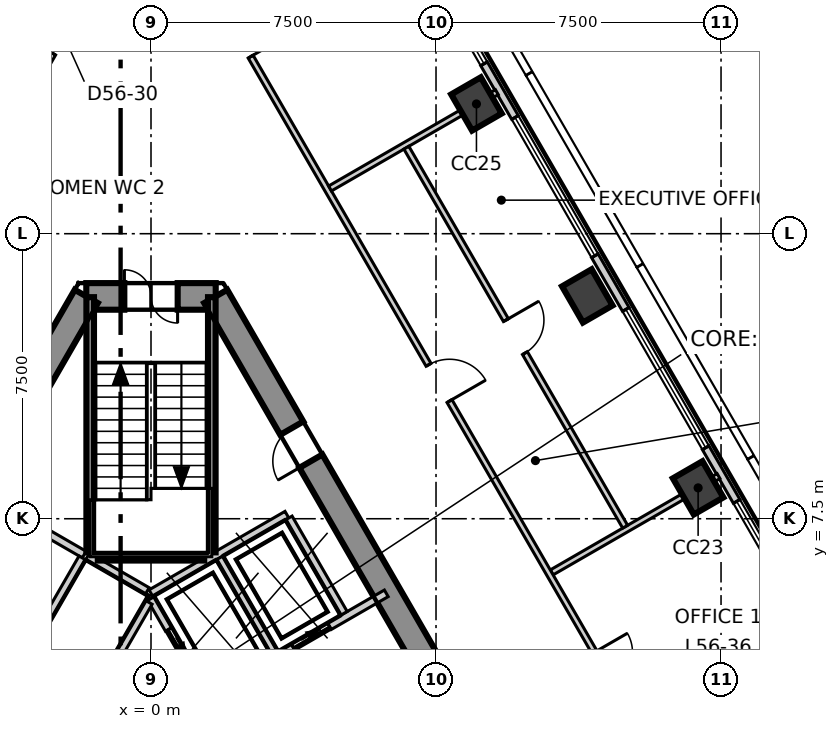
"""IFC4 building model, lengths in metres.
Left out: names, types, materials, properties, quantities, classifications, styles, units other than length and angle.
Written with IfcOpenShell. Run it as: python <this file> out.ifc"""

import sys

from ifc_helpers import new_model, si_unit, direction, frame, frame_2d, origin, origin_2d, place, context, subcontext, project, spatial, polyline, rectangle, outline, extrude, element, fill, save


model = new_model("IFC4")
c1 = context("Model", 3, precision=1e-05, world=origin(), true_north=direction((0.0, 1.0)))
c2 = subcontext(c1, "Body", "Model", "MODEL_VIEW")
j1 = project(units=[si_unit("LENGTHUNIT", "METRE"), si_unit("PLANEANGLEUNIT", "RADIAN")], contexts=[c1])
p1 = place(None, origin())
s1 = spatial("IfcSite", under=j1, at=p1, CompositionType="ELEMENT")
p2 = place(p1, origin())
s2 = spatial("IfcBuilding", under=s1, at=p2, CompositionType="ELEMENT")
p3 = place(p2, frame((0.0, 0.0, 239.3)))
s3 = spatial("IfcBuildingStorey", under=s2, at=p3, CompositionType="ELEMENT", Elevation=239.3)
p4 = place(p3, frame((1.703, 13.35, -0.3), z_axis=(0.0, 0.0, 1.0), x_axis=(-1.0, 0.0, 0.0)))
e1 = element("IfcWall", 1, at=p4, inside=s3, PredefinedType="SHEAR", context=c2, shape_type="SweptSolid", body=[
    extrude(outline(polyline([(-0.202, -0.35), (1.703, -0.35), (3.608, -0.35), (3.204, 0.35), (1.703, 0.35), (0.202, 0.35), (-0.202, -0.35)])), origin(), (0.0, 0.0, 1.0), 4.0),
])
p5 = place(p4, frame((1.003, 0.0, 0.3)))
e2 = element("IfcOpeningElement", 2, at=p5, cuts=e1, PredefinedType="OPENING", context=c2, shape_type="SweptSolid", body=[
    extrude(rectangle(XDim=1.4, YDim=2.1, at=frame_2d((0.7, 1.05))), frame((0.0, 0.36, 0.0), z_axis=(0.0, -1.0, 0.0), x_axis=(1.0, 0.0, 0.0)), (0.0, 0.0, 1.0), 0.72),
])
p6 = place(p3, frame((-1.703, 13.35, -0.3), z_axis=(0.0, 0.0, 1.0), x_axis=(-0.500011533395, -0.866018744874, 0.0)))
e3 = element("IfcWall", 3, at=p6, inside=s3, PredefinedType="SHEAR", context=c2, shape_type="SweptSolid", body=[
    extrude(outline(polyline([(-0.202, -0.35), (1.782, -0.35), (3.766, -0.35), (5.75, -0.35), (7.734, -0.35), (9.718, -0.35), (11.702, -0.35), (13.686, -0.35), (15.67, -0.35), (17.654, -0.35), (19.638, -0.35), (21.622, -0.35), (21.218, 0.35), (19.307, 0.35), (17.397, 0.35), (15.486, 0.35), (13.576, 0.35), (11.665, 0.35), (9.755, 0.35), (7.844, 0.35), (5.934, 0.35), (4.023, 0.35), (2.113, 0.35), (0.202, 0.35), (-0.202, -0.35)])), origin(), (0.0, 0.0, 1.0), 4.0),
])
p7 = place(p6, frame((10.16, 0.0, 0.3)))
e4 = element("IfcOpeningElement", 4, at=p7, cuts=e3, PredefinedType="OPENING", context=c2, shape_type="SweptSolid", body=[
    extrude(rectangle(XDim=1.1, YDim=2.1, at=frame_2d((0.55, 1.05))), frame((0.0, 0.36, 0.0), z_axis=(0.0, -1.0, 0.0), x_axis=(1.0, 0.0, 0.0)), (0.0, 0.0, 1.0), 0.72),
])
p8 = place(p3, frame((12.413, -5.2, -0.3), z_axis=(0.0, 0.0, 1.0), x_axis=(-0.500011533395, 0.866018744874, 0.0)))
e5 = element("IfcWall", 5, at=p8, inside=s3, PredefinedType="SHEAR", context=c2, shape_type="SweptSolid", body=[
    extrude(outline(polyline([(-0.202, -0.35), (1.782, -0.35), (3.766, -0.35), (5.75, -0.35), (7.734, -0.35), (9.718, -0.35), (11.702, -0.35), (13.686, -0.35), (15.67, -0.35), (17.654, -0.35), (19.638, -0.35), (21.622, -0.35), (21.218, 0.35), (19.307, 0.35), (17.397, 0.35), (15.486, 0.35), (13.576, 0.35), (11.665, 0.35), (9.755, 0.35), (7.844, 0.35), (5.934, 0.35), (4.023, 0.35), (2.113, 0.35), (0.202, 0.35), (-0.202, -0.35)])), origin(), (0.0, 0.0, 1.0), 4.0),
])
p9 = place(p8, frame((4.055, 0.0, 0.3)))
e6 = element("IfcOpeningElement", 6, at=p9, cuts=e5, PredefinedType="OPENING", context=c2, shape_type="SweptSolid", body=[
    extrude(rectangle(XDim=0.9, YDim=2.1, at=frame_2d((0.45, 1.05))), frame((0.0, 0.36, 0.0), z_axis=(0.0, -1.0, 0.0), x_axis=(1.0, 0.0, 0.0)), (0.0, 0.0, 1.0), 0.72),
])
p10 = place(p8, frame((16.415, 0.0, 0.3)))
e7 = element("IfcOpeningElement", 7, at=p10, cuts=e5, PredefinedType="OPENING", context=c2, shape_type="SweptSolid", body=[
    extrude(rectangle(XDim=1.0, YDim=2.1, at=frame_2d((0.5, 1.05))), frame((0.0, 0.36, 0.0), z_axis=(0.0, -1.0, 0.0), x_axis=(1.0, 0.0, 0.0)), (0.0, 0.0, 1.0), 0.72),
])
for number, where, z_axis, x_axis in (
    (8, (14.397, 8.312, -0.3), (0.0, 0.0, 1.0), (-0.5, 0.866, 0.0)),
    (9, (11.481, 13.363, -0.3), (0.0, 0.0, 1.0), (-0.5, 0.866, 0.0)),
    (10, (8.564, 18.414, -0.3), (0.0, 0.0, 1.0), (-0.5, 0.866, 0.0)),
):
    element("IfcColumn", number, at=place(p3, frame(where, z_axis=z_axis, x_axis=x_axis)), inside=s3, PredefinedType="COLUMN", context=c2, shape_type="SweptSolid", body=[
        extrude(rectangle(XDim=1.1, YDim=0.9, at=origin_2d()), origin(), (0.0, 0.0, 1.0), 4.0),
    ])
p11 = place(p3, frame((27.32, -12.671, 0.0), z_axis=(0.0, 0.0, 1.0), x_axis=(-0.499995097538, 0.866028234204, 0.0)))
e11 = element("IfcWall", 11, at=p11, inside=s3, PredefinedType="ELEMENTEDWALL", context=c2, shape_type="SweptSolid", body=[
    extrude(rectangle(XDim=49.247, YDim=0.2, at=frame_2d((24.623, 0.0))), origin(), (0.0, 0.0, 1.0), 3.7),
])
p12 = place(p11, frame((2.119, 0.0, 0.9)))
e12 = element("IfcOpeningElement", 12, at=p12, cuts=e11, PredefinedType="OPENING", context=c2, shape_type="SweptSolid", body=[
    extrude(rectangle(XDim=4.2, YDim=2.5, at=frame_2d((2.1, 1.25))), frame((0.0, 0.11, 0.0), z_axis=(0.0, -1.0, 0.0), x_axis=(1.0, 0.0, 0.0)), (0.0, 0.0, 1.0), 0.22),
])
p13 = place(p11, frame((7.952, 0.0, 0.9)))
e13 = element("IfcOpeningElement", 13, at=p13, cuts=e11, PredefinedType="OPENING", context=c2, shape_type="SweptSolid", body=[
    extrude(rectangle(XDim=4.2, YDim=2.5, at=frame_2d((2.1, 1.25))), frame((0.0, 0.11, 0.0), z_axis=(0.0, -1.0, 0.0), x_axis=(1.0, 0.0, 0.0)), (0.0, 0.0, 1.0), 0.22),
])
p14 = place(p11, frame((13.784, 0.0, 0.9)))
e14 = element("IfcOpeningElement", 14, at=p14, cuts=e11, PredefinedType="OPENING", context=c2, shape_type="SweptSolid", body=[
    extrude(rectangle(XDim=4.2, YDim=2.5, at=frame_2d((2.1, 1.25))), frame((0.0, 0.11, 0.0), z_axis=(0.0, -1.0, 0.0), x_axis=(1.0, 0.0, 0.0)), (0.0, 0.0, 1.0), 0.22),
])
p15 = place(p11, frame((19.617, 0.0, 0.9)))
e15 = element("IfcOpeningElement", 15, at=p15, cuts=e11, PredefinedType="OPENING", context=c2, shape_type="SweptSolid", body=[
    extrude(rectangle(XDim=4.2, YDim=2.5, at=frame_2d((2.1, 1.25))), frame((0.0, 0.11, 0.0), z_axis=(0.0, -1.0, 0.0), x_axis=(1.0, 0.0, 0.0)), (0.0, 0.0, 1.0), 0.22),
])
p16 = place(p11, frame((25.45, 0.0, 0.9)))
e16 = element("IfcOpeningElement", 16, at=p16, cuts=e11, PredefinedType="OPENING", context=c2, shape_type="SweptSolid", body=[
    extrude(rectangle(XDim=4.2, YDim=2.5, at=frame_2d((2.1, 1.25))), frame((0.0, 0.11, 0.0), z_axis=(0.0, -1.0, 0.0), x_axis=(1.0, 0.0, 0.0)), (0.0, 0.0, 1.0), 0.22),
])
p17 = place(p11, frame((31.282, 0.0, 0.9)))
e17 = element("IfcOpeningElement", 17, at=p17, cuts=e11, PredefinedType="OPENING", context=c2, shape_type="SweptSolid", body=[
    extrude(rectangle(XDim=4.2, YDim=2.5, at=frame_2d((2.1, 1.25))), frame((0.0, 0.11, 0.0), z_axis=(0.0, -1.0, 0.0), x_axis=(1.0, 0.0, 0.0)), (0.0, 0.0, 1.0), 0.22),
])
p18 = place(p11, frame((37.115, 0.0, 0.9)))
e18 = element("IfcOpeningElement", 18, at=p18, cuts=e11, PredefinedType="OPENING", context=c2, shape_type="SweptSolid", body=[
    extrude(rectangle(XDim=4.2, YDim=2.5, at=frame_2d((2.1, 1.25))), frame((0.0, 0.11, 0.0), z_axis=(0.0, -1.0, 0.0), x_axis=(1.0, 0.0, 0.0)), (0.0, 0.0, 1.0), 0.22),
])
p19 = place(p11, frame((42.947, 0.0, 0.9)))
e19 = element("IfcOpeningElement", 19, at=p19, cuts=e11, PredefinedType="OPENING", context=c2, shape_type="SweptSolid", body=[
    extrude(rectangle(XDim=4.2, YDim=2.5, at=frame_2d((2.1, 1.25))), frame((0.0, 0.11, 0.0), z_axis=(0.0, -1.0, 0.0), x_axis=(1.0, 0.0, 0.0)), (0.0, 0.0, 1.0), 0.22),
])
p20 = place(p3, frame((10.544, 6.088, 0.0), z_axis=(0.0, 0.0, 1.0), x_axis=(0.866065287345, 0.499930913282, 0.0)))
e20 = element("IfcWall", 20, at=p20, inside=s3, PredefinedType="PARTITIONING", context=c2, shape_type="SweptSolid", body=[
    extrude(rectangle(XDim=5.069, YDim=0.15, at=frame_2d((2.535, 0.0))), origin(), (0.0, 0.0, 1.0), 3.2),
])
p21 = place(p3, frame((-20.883, -11.97, 0.0), z_axis=(0.0, 0.0, 1.0), x_axis=(0.500006150555, 0.866021852731, 0.0)))
e21 = element("IfcWall", 21, at=p21, inside=s3, PredefinedType="PARTITIONING", context=c2, shape_type="SweptSolid", body=[
    extrude(rectangle(XDim=41.766, YDim=0.15, at=frame_2d((20.883, 0.0))), origin(), (0.0, 0.0, 1.0), 3.7),
])
p22 = place(p21, frame((36.616, 0.0, 0.0)))
e22 = element("IfcOpeningElement", 22, at=p22, cuts=e21, PredefinedType="OPENING", context=c2, shape_type="SweptSolid", body=[
    extrude(rectangle(XDim=1.1, YDim=2.1, at=frame_2d((0.55, 1.05))), frame((0.0, 0.085, 0.0), z_axis=(0.0, -1.0, 0.0), x_axis=(1.0, 0.0, 0.0)), (0.0, 0.0, 1.0), 0.17),
])
p23 = place(p21, frame((21.723, 0.0, 0.0)))
e23 = element("IfcOpeningElement", 23, at=p23, cuts=e21, PredefinedType="OPENING", context=c2, shape_type="SweptSolid", body=[
    extrude(rectangle(XDim=1.1, YDim=2.1, at=frame_2d((0.55, 1.05))), frame((0.0, 0.085, 0.0), z_axis=(0.0, -1.0, 0.0), x_axis=(1.0, 0.0, 0.0)), (0.0, 0.0, 1.0), 0.17),
])
p24 = place(p21, frame((30.423, 0.0, 0.0)))
e24 = element("IfcOpeningElement", 24, at=p24, cuts=e21, PredefinedType="OPENING", context=c2, shape_type="SweptSolid", body=[
    extrude(rectangle(XDim=0.9, YDim=2.1, at=frame_2d((0.45, 1.05))), frame((0.0, 0.085, 0.0), z_axis=(0.0, -1.0, 0.0), x_axis=(1.0, 0.0, 0.0)), (0.0, 0.0, 1.0), 0.17),
])
p25 = place(p21, frame((27.223, 0.0, 0.0)))
e25 = element("IfcOpeningElement", 25, at=p25, cuts=e21, PredefinedType="OPENING", context=c2, shape_type="SweptSolid", body=[
    extrude(rectangle(XDim=0.9, YDim=2.1, at=frame_2d((0.45, 1.05))), frame((0.0, 0.085, 0.0), z_axis=(0.0, -1.0, 0.0), x_axis=(1.0, 0.0, 0.0)), (0.0, 0.0, 1.0), 0.17),
])
p26 = place(p21, frame((24.323, 0.0, 0.0)))
e26 = element("IfcOpeningElement", 26, at=p26, cuts=e21, PredefinedType="OPENING", context=c2, shape_type="SweptSolid", body=[
    extrude(rectangle(XDim=1.0, YDim=2.1, at=frame_2d((0.5, 1.05))), frame((0.0, 0.085, 0.0), z_axis=(0.0, -1.0, 0.0), x_axis=(1.0, 0.0, 0.0)), (0.0, 0.0, 1.0), 0.17),
])
p27 = place(p21, frame((17.358, 0.0, 0.0)))
e27 = element("IfcOpeningElement", 27, at=p27, cuts=e21, PredefinedType="OPENING", context=c2, shape_type="SweptSolid", body=[
    extrude(rectangle(XDim=1.0, YDim=2.1, at=frame_2d((0.5, 1.05))), frame((0.0, 0.085, 0.0), z_axis=(0.0, -1.0, 0.0), x_axis=(1.0, 0.0, 0.0)), (0.0, 0.0, 1.0), 0.17),
])
p28 = place(p21, frame((6.825, 0.0, 0.0)))
e28 = element("IfcOpeningElement", 28, at=p28, cuts=e21, PredefinedType="OPENING", context=c2, shape_type="SweptSolid", body=[
    extrude(rectangle(XDim=1.1, YDim=2.1, at=frame_2d((0.55, 1.05))), frame((0.0, 0.085, 0.0), z_axis=(0.0, -1.0, 0.0), x_axis=(1.0, 0.0, 0.0)), (0.0, 0.0, 1.0), 0.17),
])
p29 = place(p3, frame((0.075, 24.07, 0.0), z_axis=(0.0, 0.0, 1.0), x_axis=(0.500006834213, -0.866021458014, 0.0)))
e29 = element("IfcWall", 29, at=p29, inside=s3, PredefinedType="PARTITIONING", context=c2, shape_type="SweptSolid", body=[
    extrude(rectangle(XDim=41.616, YDim=0.15, at=frame_2d((20.808, 0.0))), origin(), (0.0, 0.0, 1.0), 3.7),
])
p30 = place(p29, frame((36.616, 0.0, 0.0)))
e30 = element("IfcOpeningElement", 30, at=p30, cuts=e29, PredefinedType="OPENING", context=c2, shape_type="SweptSolid", body=[
    extrude(rectangle(XDim=1.1, YDim=2.1, at=frame_2d((0.55, 1.05))), frame((0.0, 0.085, 0.0), z_axis=(0.0, -1.0, 0.0), x_axis=(1.0, 0.0, 0.0)), (0.0, 0.0, 1.0), 0.17),
])
p31 = place(p29, frame((29.024, 0.0, 0.0)))
e31 = element("IfcOpeningElement", 31, at=p31, cuts=e29, PredefinedType="OPENING", context=c2, shape_type="SweptSolid", body=[
    extrude(rectangle(XDim=1.0, YDim=2.1, at=frame_2d((0.5, 1.05))), frame((0.0, 0.085, 0.0), z_axis=(0.0, -1.0, 0.0), x_axis=(1.0, 0.0, 0.0)), (0.0, 0.0, 1.0), 0.17),
])
p32 = place(p29, frame((23.19, 0.0, 0.0)))
e32 = element("IfcOpeningElement", 32, at=p32, cuts=e29, PredefinedType="OPENING", context=c2, shape_type="SweptSolid", body=[
    extrude(rectangle(XDim=1.0, YDim=2.1, at=frame_2d((0.5, 1.05))), frame((0.0, 0.085, 0.0), z_axis=(0.0, -1.0, 0.0), x_axis=(1.0, 0.0, 0.0)), (0.0, 0.0, 1.0), 0.17),
])
p33 = place(p29, frame((14.458, 0.0, 0.0)))
e33 = element("IfcOpeningElement", 33, at=p33, cuts=e29, PredefinedType="OPENING", context=c2, shape_type="SweptSolid", body=[
    extrude(rectangle(XDim=1.1, YDim=2.1, at=frame_2d((0.55, 1.05))), frame((0.0, 0.085, 0.0), z_axis=(0.0, -1.0, 0.0), x_axis=(1.0, 0.0, 0.0)), (0.0, 0.0, 1.0), 0.17),
])
p34 = place(p29, frame((3.993, 0.0, 0.0)))
e34 = element("IfcOpeningElement", 34, at=p34, cuts=e29, PredefinedType="OPENING", context=c2, shape_type="SweptSolid", body=[
    extrude(rectangle(XDim=1.1, YDim=2.1, at=frame_2d((0.55, 1.05))), frame((0.0, 0.085, 0.0), z_axis=(0.0, -1.0, 0.0), x_axis=(1.0, 0.0, 0.0)), (0.0, 0.0, 1.0), 0.17),
])
p35 = place(p3, frame((4.711, 16.19, 0.0), z_axis=(0.0, 0.0, 1.0), x_axis=(0.866065287345, 0.499930913282, 0.0)))
e35 = element("IfcWall", 35, at=p35, inside=s3, PredefinedType="PARTITIONING", context=c2, shape_type="SweptSolid", body=[
    extrude(rectangle(XDim=5.069, YDim=0.15, at=frame_2d((2.535, 0.0))), origin(), (0.0, 0.0, 1.0), 3.7),
])
p36 = place(p3, frame((6.72, 17.263, 0.0), z_axis=(0.0, 0.0, 1.0), x_axis=(0.499949415664, -0.866054606695, 0.0)))
e36 = element("IfcWall", 36, at=p36, inside=s3, PredefinedType="PARTITIONING", context=c2, shape_type="SweptSolid", body=[
    extrude(rectangle(XDim=11.515, YDim=0.15, at=frame_2d((5.758, 0.0))), origin(), (0.0, 0.0, 1.0), 3.7),
])
p37 = place(p36, frame((5.24, 0.0, 0.0)))
e37 = element("IfcOpeningElement", 37, at=p37, cuts=e36, PredefinedType="OPENING", context=c2, shape_type="SweptSolid", body=[
    extrude(rectangle(XDim=1.0, YDim=2.1, at=frame_2d((0.5, 1.05))), frame((0.0, 0.085, 0.0), z_axis=(0.0, -1.0, 0.0), x_axis=(1.0, 0.0, 0.0)), (0.0, 0.0, 1.0), 0.17),
])
p38 = place(p3, frame((-0.002, 5.541, 0.0), z_axis=(0.0, 0.0, 1.0), x_axis=(0.86600155993, 0.500041296494, 0.0)))
e38 = element("IfcWall", 38, at=p38, inside=s3, PredefinedType="SOLIDWALL", context=c2, shape_type="SweptSolid", body=[
    extrude(rectangle(XDim=4.132, YDim=0.2, at=frame_2d((2.066, 0.0))), origin(), (0.0, 0.0, 1.0), 3.7),
])
p39 = place(p3, frame((0.0, 5.4, 0.0), z_axis=(0.0, 0.0, 1.0), x_axis=(0.500103862429, -0.865965430478, 0.0)))
e39 = element("IfcWall", 39, at=p39, inside=s3, PredefinedType="SOLIDWALL", context=c2, shape_type="SweptSolid", body=[
    extrude(rectangle(XDim=2.973, YDim=0.2, at=frame_2d((1.487, 0.0))), origin(), (0.0, 0.0, 1.0), 3.7),
])
p40 = place(p39, frame((0.937, 0.0, 0.0)))
e40 = element("IfcOpeningElement", 40, at=p40, cuts=e39, PredefinedType="OPENING", context=c2, shape_type="SweptSolid", body=[
    extrude(rectangle(XDim=1.1, YDim=2.1, at=frame_2d((0.55, 1.05))), frame((0.0, 0.11, 0.0), z_axis=(0.0, -1.0, 0.0), x_axis=(1.0, 0.0, 0.0)), (0.0, 0.0, 1.0), 0.22),
])
p41 = place(p3, frame((1.578, 2.874, 0.0), z_axis=(0.0, 0.0, 1.0), x_axis=(0.866045911672, 0.499964477614, 0.0)))
e41 = element("IfcWall", 41, at=p41, inside=s3, PredefinedType="SOLIDWALL", context=c2, shape_type="SweptSolid", body=[
    extrude(rectangle(XDim=5.327, YDim=0.2, at=frame_2d((2.663, 0.0))), origin(), (0.0, 0.0, 1.0), 3.7),
])
p42 = place(p41, frame((2.496, 0.0, 0.0)))
e42 = element("IfcOpeningElement", 42, at=p42, cuts=e41, PredefinedType="OPENING", context=c2, shape_type="SweptSolid", body=[
    extrude(rectangle(XDim=1.1, YDim=2.1, at=frame_2d((0.55, 1.05))), frame((0.0, 0.11, 0.0), z_axis=(0.0, -1.0, 0.0), x_axis=(1.0, 0.0, 0.0)), (0.0, 0.0, 1.0), 0.22),
])
for number, where, z_axis, x_axis in (
    (43, (3.626, 7.52, 0.0), (0.0, 0.0, 1.0), (0.5, -0.866, 0.0)),
    (44, (1.807, 6.47, 0.0), (0.0, 0.0, 1.0), (0.5, -0.866, 0.0)),
):
    element("IfcWall", number, at=place(p3, frame(where, z_axis=z_axis, x_axis=x_axis)), inside=s3, PredefinedType="SOLIDWALL", context=c2, shape_type="SweptSolid", body=[
        extrude(rectangle(XDim=2.9, YDim=0.2, at=frame_2d((1.45, 0.0))), origin(), (0.0, 0.0, 1.0), 3.7),
    ])
p43 = place(p3, frame((-3.489, 7.557, 0.0), z_axis=(0.0, 0.0, 1.0), x_axis=(0.866010750942, -0.50002537861, 0.0)))
e45 = element("IfcWall", 45, at=p43, inside=s3, PredefinedType="SOLIDWALL", context=c2, shape_type="SweptSolid", body=[
    extrude(rectangle(XDim=2.0, YDim=0.2, at=frame_2d((1.0, 0.0))), origin(), (0.0, 0.0, 1.0), 3.7),
])
p44 = place(p3, frame((-3.257, 3.959, 0.0), z_axis=(0.0, 0.0, 1.0), x_axis=(0.50012328804, 0.865954211699, 0.0)))
e46 = element("IfcWall", 46, at=p44, inside=s3, PredefinedType="SOLIDWALL", context=c2, shape_type="SweptSolid", body=[
    extrude(rectangle(XDim=2.9, YDim=0.2, at=frame_2d((1.45, 0.0))), origin(), (0.0, 0.0, 1.0), 3.7),
])
p45 = place(p3, frame((-1.67, 6.507, 0.0), z_axis=(0.0, 0.0, 1.0), x_axis=(0.865941441609, -0.500145398563, 0.0)))
e47 = element("IfcWall", 47, at=p45, inside=s3, PredefinedType="SOLIDWALL", context=c2, shape_type="SweptSolid", body=[
    extrude(rectangle(XDim=1.815, YDim=0.2, at=frame_2d((0.908, 0.0))), origin(), (0.0, 0.0, 1.0), 3.7),
])
p46 = place(p3, frame((-1.438, 2.909, 0.0), z_axis=(0.0, 0.0, 1.0), x_axis=(0.499829630636, 0.866123744241, 0.0)))
e48 = element("IfcWall", 48, at=p46, inside=s3, PredefinedType="SOLIDWALL", context=c2, shape_type="SweptSolid", body=[
    extrude(rectangle(XDim=2.761, YDim=0.2, at=frame_2d((1.38, 0.0))), origin(), (0.0, 0.0, 1.0), 3.7),
])
p47 = place(p3, frame((1.6, 6.615, 0.0), z_axis=(0.0, 0.0, 1.0), x_axis=(0.0, 1.0, 0.0)))
e49 = element("IfcWall", 49, at=p47, inside=s3, PredefinedType="SOLIDWALL", context=c2, shape_type="SweptSolid", body=[
    extrude(rectangle(XDim=6.715, YDim=0.2, at=frame_2d((3.357, 0.0))), origin(), (0.0, 0.0, 1.0), 3.7),
])
p48 = place(p3, frame((-1.4, 6.5, 0.0), z_axis=(0.0, 0.0, 1.0), x_axis=(1.0, 0.0, 0.0)))
e50 = element("IfcWall", 50, at=p48, inside=s3, PredefinedType="SOLIDWALL", context=c2, shape_type="SweptSolid", body=[
    extrude(rectangle(XDim=2.8, YDim=0.2, at=frame_2d((1.4, 0.0))), origin(), (0.0, 0.0, 1.0), 3.7),
])
p49 = place(p3, frame((-1.6, 6.615, 0.0), z_axis=(0.0, 0.0, 1.0), x_axis=(0.0, 1.0, 0.0)))
e51 = element("IfcWall", 51, at=p49, inside=s3, PredefinedType="SOLIDWALL", context=c2, shape_type="SweptSolid", body=[
    extrude(rectangle(XDim=6.715, YDim=0.2, at=frame_2d((3.357, 0.0))), origin(), (0.0, 0.0, 1.0), 3.7),
])
p50 = place(p15, origin())
e52 = element("IfcWindow", 52, at=p50, inside=s3, PartitioningType="SINGLE_PANEL", PredefinedType="WINDOW", context=c2, shape_type="SweptSolid", body=[
    extrude(rectangle(XDim=4.2, YDim=2.5, at=frame_2d((2.1, 1.25))), frame((0.0, 0.03, 0.0), z_axis=(0.0, -1.0, 0.0), x_axis=(1.0, 0.0, 0.0)), (0.0, 0.0, 1.0), 0.06),
])
fill(e15, e52)
p51 = place(p16, origin())
e53 = element("IfcWindow", 53, at=p51, inside=s3, PartitioningType="SINGLE_PANEL", PredefinedType="WINDOW", context=c2, shape_type="SweptSolid", body=[
    extrude(rectangle(XDim=4.2, YDim=2.5, at=frame_2d((2.1, 1.25))), frame((0.0, 0.03, 0.0), z_axis=(0.0, -1.0, 0.0), x_axis=(1.0, 0.0, 0.0)), (0.0, 0.0, 1.0), 0.06),
])
fill(e16, e53)
p52 = place(p17, origin())
e54 = element("IfcWindow", 54, at=p52, inside=s3, PartitioningType="SINGLE_PANEL", PredefinedType="WINDOW", context=c2, shape_type="SweptSolid", body=[
    extrude(rectangle(XDim=4.2, YDim=2.5, at=frame_2d((2.1, 1.25))), frame((0.0, 0.03, 0.0), z_axis=(0.0, -1.0, 0.0), x_axis=(1.0, 0.0, 0.0)), (0.0, 0.0, 1.0), 0.06),
])
fill(e17, e54)
p53 = place(p18, origin())
e55 = element("IfcWindow", 55, at=p53, inside=s3, PartitioningType="SINGLE_PANEL", PredefinedType="WINDOW", context=c2, shape_type="SweptSolid", body=[
    extrude(rectangle(XDim=4.2, YDim=2.5, at=frame_2d((2.1, 1.25))), frame((0.0, 0.03, 0.0), z_axis=(0.0, -1.0, 0.0), x_axis=(1.0, 0.0, 0.0)), (0.0, 0.0, 1.0), 0.06),
])
fill(e18, e55)
p54 = place(p40, origin())
e56 = element("IfcDoor", 56, at=p54, inside=s3, OperationType="SLIDING_TO_LEFT", PredefinedType="DOOR", context=c2, shape_type="SweptSolid", body=[
    extrude(rectangle(XDim=1.1, YDim=2.1, at=frame_2d((0.55, 1.05))), frame((0.0, 0.025, 0.0), z_axis=(0.0, -1.0, 0.0), x_axis=(1.0, 0.0, 0.0)), (0.0, 0.0, 1.0), 0.05),
])
fill(e40, e56)
p55 = place(p42, origin())
e57 = element("IfcDoor", 57, at=p55, inside=s3, OperationType="SLIDING_TO_LEFT", PredefinedType="DOOR", context=c2, shape_type="SweptSolid", body=[
    extrude(rectangle(XDim=1.1, YDim=2.1, at=frame_2d((0.55, 1.05))), frame((0.0, 0.025, 0.0), z_axis=(0.0, -1.0, 0.0), x_axis=(1.0, 0.0, 0.0)), (0.0, 0.0, 1.0), 0.05),
])
fill(e42, e57)
p56 = place(p33, origin())
e58 = element("IfcDoor", 58, at=p56, inside=s3, OperationType="SINGLE_SWING_LEFT", PredefinedType="DOOR", context=c2, shape_type="SweptSolid", body=[
    extrude(rectangle(XDim=1.1, YDim=2.1, at=frame_2d((0.55, 1.05))), frame((0.0, 0.025, 0.0), z_axis=(0.0, -1.0, 0.0), x_axis=(1.0, 0.0, 0.0)), (0.0, 0.0, 1.0), 0.05),
])
fill(e33, e58)
p57 = place(p37, origin())
e59 = element("IfcDoor", 59, at=p57, inside=s3, OperationType="SINGLE_SWING_RIGHT", PredefinedType="DOOR", context=c2, shape_type="SweptSolid", body=[
    extrude(rectangle(XDim=1.0, YDim=2.1, at=frame_2d((0.5, 1.05))), frame((0.0, 0.025, 0.0), z_axis=(0.0, -1.0, 0.0), x_axis=(1.0, 0.0, 0.0)), (0.0, 0.0, 1.0), 0.05),
])
fill(e37, e59)
p58 = place(p34, origin())
e60 = element("IfcDoor", 60, at=p58, inside=s3, OperationType="SINGLE_SWING_LEFT", PredefinedType="DOOR", context=c2, shape_type="SweptSolid", body=[
    extrude(rectangle(XDim=1.1, YDim=2.1, at=frame_2d((0.55, 1.05))), frame((0.0, 0.025, 0.0), z_axis=(0.0, -1.0, 0.0), x_axis=(1.0, 0.0, 0.0)), (0.0, 0.0, 1.0), 0.05),
])
fill(e34, e60)
p59 = place(p22, origin())
e61 = element("IfcDoor", 61, at=p59, inside=s3, OperationType="SINGLE_SWING_RIGHT", PredefinedType="DOOR", context=c2, shape_type="SweptSolid", body=[
    extrude(rectangle(XDim=1.1, YDim=2.1, at=frame_2d((0.55, 1.05))), frame((0.0, 0.025, 0.0), z_axis=(0.0, -1.0, 0.0), x_axis=(1.0, 0.0, 0.0)), (0.0, 0.0, 1.0), 0.05),
])
fill(e22, e61)
p60 = place(p5, origin())
e62 = element("IfcDoor", 62, at=p60, inside=s3, OperationType="DOUBLE_DOOR_SINGLE_SWING", PredefinedType="DOOR", context=c2, shape_type="SweptSolid", body=[
    extrude(rectangle(XDim=1.4, YDim=2.1, at=frame_2d((0.7, 1.05))), frame((0.0, 0.025, 0.0), z_axis=(0.0, -1.0, 0.0), x_axis=(1.0, 0.0, 0.0)), (0.0, 0.0, 1.0), 0.05),
])
fill(e2, e62)
p61 = place(p10, origin())
e63 = element("IfcDoor", 63, at=p61, inside=s3, OperationType="SINGLE_SWING_RIGHT", PredefinedType="DOOR", context=c2, shape_type="SweptSolid", body=[
    extrude(rectangle(XDim=1.0, YDim=2.1, at=frame_2d((0.5, 1.05))), frame((0.0, 0.025, 0.0), z_axis=(0.0, -1.0, 0.0), x_axis=(1.0, 0.0, 0.0)), (0.0, 0.0, 1.0), 0.05),
])
fill(e7, e63)
save(model, sys.argv[1])
